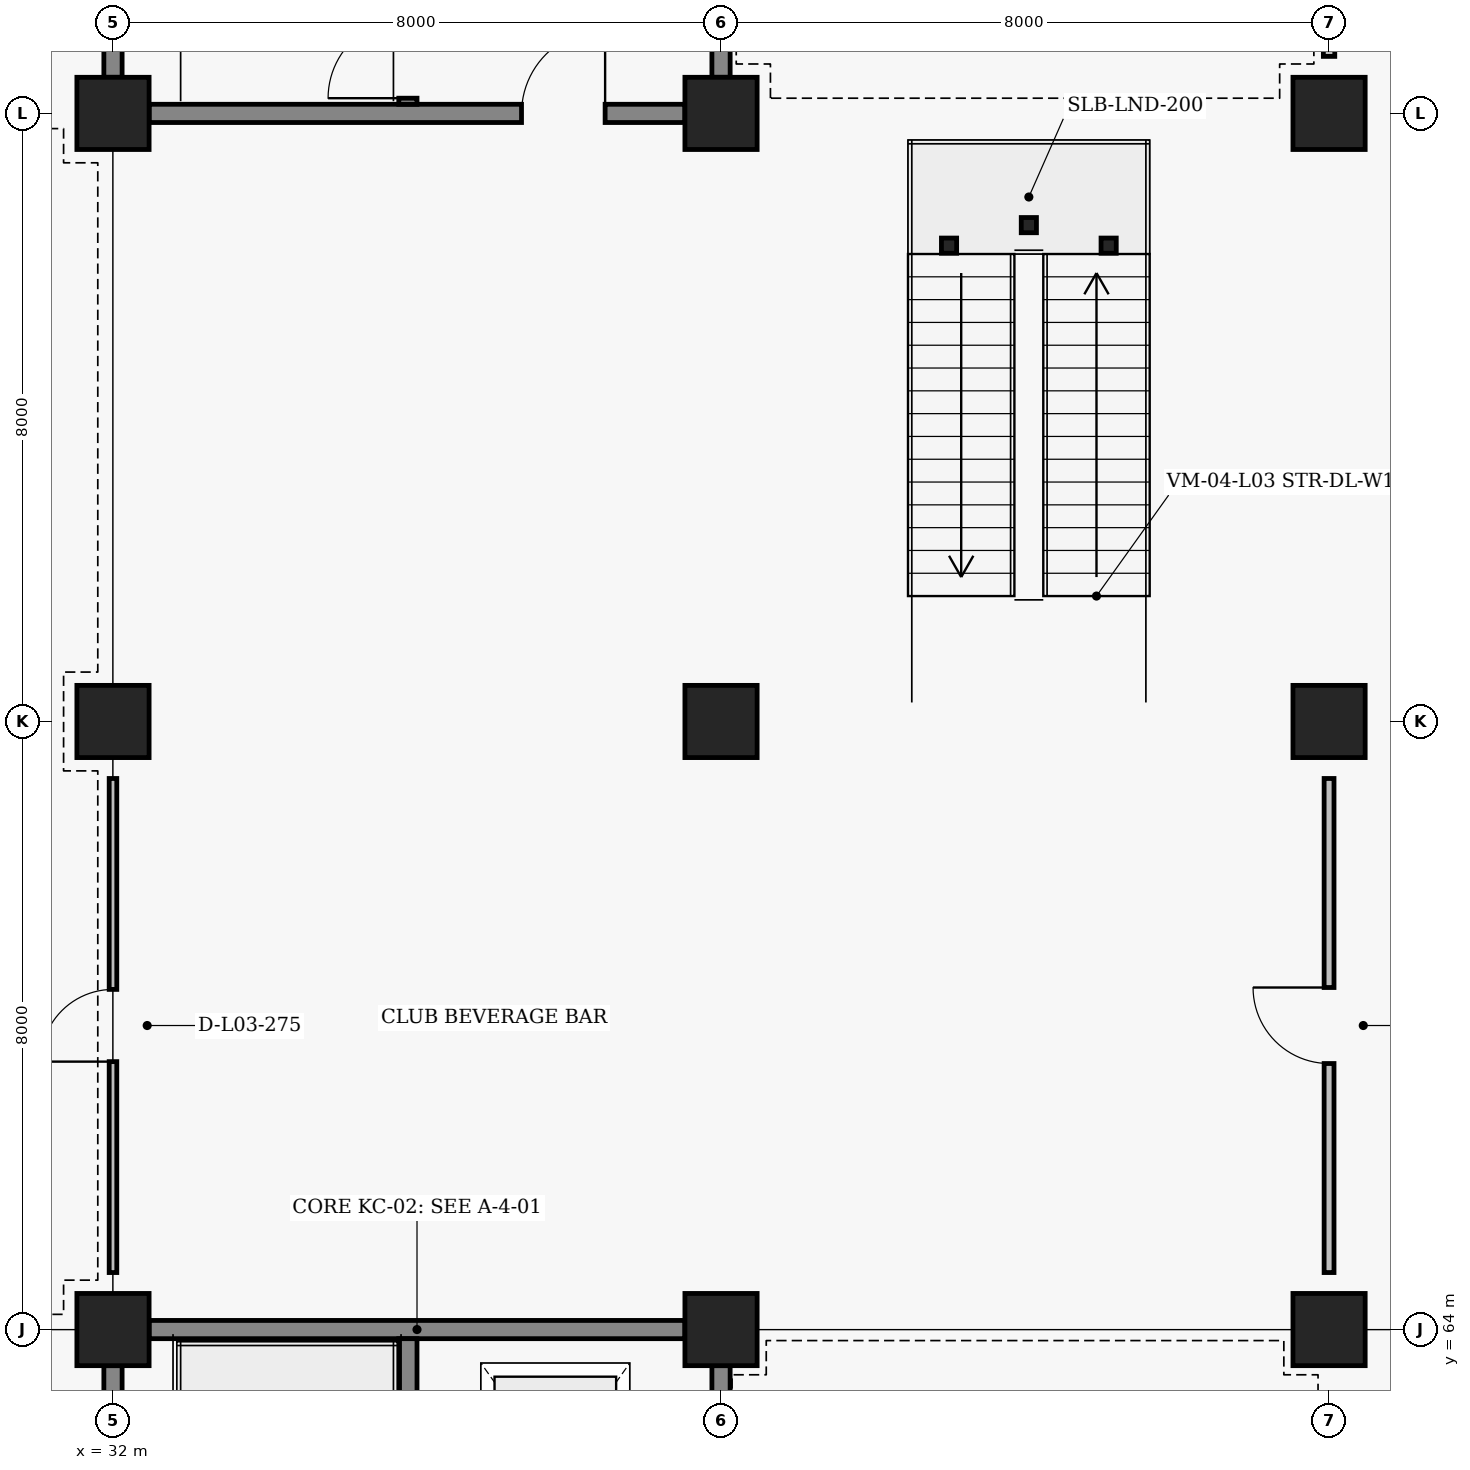
"""IFC4 building model, lengths in metres.
Left out: names, types, materials, properties, quantities, classifications, styles, units other than length and angle.
Written with IfcOpenShell. Run it as: python <this file> out.ifc"""

import sys

from ifc_helpers import new_model, si_unit, direction, frame, frame_2d, origin, origin_2d, place, context, subcontext, project, spatial, rectangle, hollow_rectangle, extrude, element, fill, save


model = new_model("IFC4")
c1 = context("Model", 3, precision=1e-05, world=origin(), true_north=direction((0.0, 1.0)))
c2 = subcontext(c1, "Body", "Model", "MODEL_VIEW")
j1 = project(units=[si_unit("LENGTHUNIT", "METRE"), si_unit("PLANEANGLEUNIT", "RADIAN")], contexts=[c1])
p1 = place(None, origin())
s1 = spatial("IfcSite", under=j1, at=p1, CompositionType="ELEMENT")
p2 = place(p1, origin())
s2 = spatial("IfcBuilding", under=s1, at=p2, CompositionType="ELEMENT")
p3 = place(p2, frame((0.0, 0.0, 9.6)))
s3 = spatial("IfcBuildingStorey", under=s2, at=p3, CompositionType="ELEMENT", Elevation=9.6)
for number, where, z_axis, x_axis in (
    (1, (32.0, 64.0, 0.0), (0.0, 0.0, 1.0), (1.0, 0.0, 0.0)),
    (2, (32.0, 72.0, 0.0), (0.0, 0.0, 1.0), (1.0, 0.0, 0.0)),
    (3, (32.0, 80.0, 0.0), (0.0, 0.0, 1.0), (1.0, 0.0, 0.0)),
    (4, (40.0, 64.0, 0.0), (0.0, 0.0, 1.0), (1.0, 0.0, 0.0)),
    (5, (40.0, 72.0, 0.0), (0.0, 0.0, 1.0), (1.0, 0.0, 0.0)),
    (6, (40.0, 80.0, 0.0), (0.0, 0.0, 1.0), (1.0, 0.0, 0.0)),
    (7, (48.0, 64.0, 0.0), (0.0, 0.0, 1.0), (1.0, 0.0, 0.0)),
    (8, (48.0, 72.0, 0.0), (0.0, 0.0, 1.0), (1.0, 0.0, 0.0)),
    (9, (48.0, 80.0, 0.0), (0.0, 0.0, 1.0), (1.0, 0.0, 0.0)),
):
    element("IfcColumn", number, at=place(p3, frame(where, z_axis=z_axis, x_axis=x_axis)), inside=s3, PredefinedType="COLUMN", context=c2, shape_type="SweptSolid", body=[
        extrude(rectangle(XDim=0.95, YDim=0.95, at=origin_2d()), origin(), (0.0, 0.0, 1.0), 4.8),
    ])
for number, where, z_axis, x_axis in (
    (10, (32.475, 64.0, 0.0), (0.0, 0.0, 1.0), (1.0, 0.0, 0.0)),
    (11, (32.0, 56.475, 0.0), (0.0, 0.0, 1.0), (0.0, 1.0, 0.0)),
    (12, (40.0, 56.475, 0.0), (0.0, 0.0, 1.0), (0.0, 1.0, 0.0)),
):
    element("IfcWall", number, at=place(p3, frame(where, z_axis=z_axis, x_axis=x_axis)), inside=s3, PredefinedType="SHEAR", context=c2, shape_type="SweptSolid", body=[
        extrude(rectangle(XDim=7.05, YDim=0.24, at=frame_2d((3.525, 0.0))), origin(), (0.0, 0.0, 1.0), 3.93),
    ])
p4 = place(p3, frame((35.88, 56.12, 0.0), z_axis=(0.0, 0.0, 1.0), x_axis=(0.0, 1.0, 0.0)))
e13 = element("IfcWall", 13, at=p4, inside=s3, PredefinedType="SHEAR", context=c2, shape_type="SweptSolid", body=[
    extrude(rectangle(XDim=7.76, YDim=0.24, at=frame_2d((3.88, 0.0))), origin(), (0.0, 0.0, 1.0), 4.03),
])
p5 = place(p4, frame((0.08, 0.0, 0.0)))
e14 = element("IfcOpeningElement", 14, at=p5, cuts=e13, PredefinedType="OPENING", context=c2, shape_type="SweptSolid", body=[
    extrude(rectangle(XDim=1.05, YDim=2.15, at=frame_2d((0.525, 1.075))), frame((0.0, 0.13, 0.0), z_axis=(0.0, -1.0, 0.0), x_axis=(1.0, 0.0, 0.0)), (0.0, 0.0, 1.0), 0.26),
])
p6 = place(p3, frame((32.475, 80.0, 0.0), z_axis=(0.0, 0.0, 1.0), x_axis=(1.0, 0.0, 0.0)))
e15 = element("IfcWall", 15, at=p6, inside=s3, PredefinedType="SHEAR", context=c2, shape_type="SweptSolid", body=[
    extrude(rectangle(XDim=7.05, YDim=0.24, at=frame_2d((3.525, 0.0))), origin(), (0.0, 0.0, 1.0), 3.93),
])
p7 = place(p6, frame((4.9, 0.0, 0.0)))
e16 = element("IfcOpeningElement", 16, at=p7, cuts=e15, PredefinedType="OPENING", context=c2, shape_type="SweptSolid", body=[
    extrude(rectangle(XDim=1.1, YDim=2.2, at=frame_2d((0.55, 1.1))), frame((0.0, 0.13, 0.0), z_axis=(0.0, -1.0, 0.0), x_axis=(1.0, 0.0, 0.0)), (0.0, 0.0, 1.0), 0.26),
])
p8 = place(p3, frame((32.0, 80.475, 0.0), z_axis=(0.0, 0.0, 1.0), x_axis=(0.0, 1.0, 0.0)))
e17 = element("IfcWall", 17, at=p8, inside=s3, PredefinedType="SHEAR", context=c2, shape_type="SweptSolid", body=[
    extrude(rectangle(XDim=7.05, YDim=0.24, at=frame_2d((3.525, 0.0))), origin(), (0.0, 0.0, 1.0), 3.93),
])
p9 = place(p3, frame((40.0, 80.475, 0.0), z_axis=(0.0, 0.0, 1.0), x_axis=(0.0, 1.0, 0.0)))
e18 = element("IfcWall", 18, at=p9, inside=s3, PredefinedType="SHEAR", context=c2, shape_type="SweptSolid", body=[
    extrude(rectangle(XDim=7.05, YDim=0.24, at=frame_2d((3.525, 0.0))), origin(), (0.0, 0.0, 1.0), 3.68),
])
p10 = place(p3, frame((35.88, 80.12, 0.0), z_axis=(0.0, 0.0, 1.0), x_axis=(0.0, 1.0, 0.0)))
e19 = element("IfcWall", 19, at=p10, inside=s3, PredefinedType="SHEAR", context=c2, shape_type="SweptSolid", body=[
    extrude(rectangle(XDim=7.76, YDim=0.24, at=frame_2d((3.88, 0.0))), origin(), (0.0, 0.0, 1.0), 4.03),
])
p11 = place(p10, frame((0.08, 0.0, 0.0)))
e20 = element("IfcOpeningElement", 20, at=p11, cuts=e19, PredefinedType="OPENING", context=c2, shape_type="SweptSolid", body=[
    extrude(rectangle(XDim=1.05, YDim=2.15, at=frame_2d((0.525, 1.075))), frame((0.0, 0.13, 0.0), z_axis=(0.0, -1.0, 0.0), x_axis=(1.0, 0.0, 0.0)), (0.0, 0.0, 1.0), 0.26),
])
for number, where, z_axis, x_axis in (
    (21, (43.0, 78.26, 0.0), (0.0, 0.0, 1.0), (1.0, 0.0, 0.0)),
    (22, (45.1, 78.26, 0.0), (0.0, 0.0, 1.0), (1.0, 0.0, 0.0)),
    (23, (44.05, 78.53, 0.0), (0.0, 0.0, 1.0), (1.0, 0.0, 0.0)),
):
    element("IfcColumn", number, at=place(p3, frame(where, z_axis=z_axis, x_axis=x_axis)), inside=s3, PredefinedType="COLUMN", context=c2, shape_type="SweptSolid", body=[
        extrude(hollow_rectangle(XDim=0.2, YDim=0.2, WallThickness=0.009, at=origin_2d()), origin(), (0.0, 0.0, 1.0), 2.2),
    ])
p12 = place(p3, frame((32.0, 64.75, 0.0), z_axis=(0.0, 0.0, 1.0), x_axis=(0.0, 1.0, 0.0)))
e24 = element("IfcWall", 24, at=p12, inside=s3, PredefinedType="PARTITIONING", context=c2, shape_type="SweptSolid", body=[
    extrude(rectangle(XDim=6.5, YDim=0.1, at=frame_2d((3.25, 0.0))), origin(), (0.0, 0.0, 1.0), 3.93),
])
p13 = place(p12, frame((2.775, 0.0, 0.0)))
e25 = element("IfcOpeningElement", 25, at=p13, cuts=e24, PredefinedType="OPENING", context=c2, shape_type="SweptSolid", body=[
    extrude(rectangle(XDim=0.95, YDim=2.1, at=frame_2d((0.475, 1.05))), frame((0.0, 0.06, 0.0), z_axis=(0.0, -1.0, 0.0), x_axis=(1.0, 0.0, 0.0)), (0.0, 0.0, 1.0), 0.12),
])
p14 = place(p3, frame((48.0, 64.75, 0.0), z_axis=(0.0, 0.0, 1.0), x_axis=(0.0, 1.0, 0.0)))
e26 = element("IfcWall", 26, at=p14, inside=s3, PredefinedType="PARTITIONING", context=c2, shape_type="SweptSolid", body=[
    extrude(rectangle(XDim=6.5, YDim=0.13, at=frame_2d((3.25, 0.0))), origin(), (0.0, 0.0, 1.0), 3.93),
])
p15 = place(p14, frame((2.75, 0.0, 0.0)))
e27 = element("IfcOpeningElement", 27, at=p15, cuts=e26, PredefinedType="OPENING", context=c2, shape_type="SweptSolid", body=[
    extrude(rectangle(XDim=1.0, YDim=2.1, at=frame_2d((0.5, 1.05))), frame((0.0, 0.075, 0.0), z_axis=(0.0, -1.0, 0.0), x_axis=(1.0, 0.0, 0.0)), (0.0, 0.0, 1.0), 0.15),
])
p16 = place(p3, frame((48.0, 80.75, 0.0), z_axis=(0.0, 0.0, 1.0), x_axis=(0.0, 1.0, 0.0)))
e28 = element("IfcWall", 28, at=p16, inside=s3, PredefinedType="PARTITIONING", context=c2, shape_type="SweptSolid", body=[
    extrude(rectangle(XDim=6.5, YDim=0.15, at=frame_2d((3.25, 0.0))), origin(), (0.0, 0.0, 1.0), 3.93),
])
p17 = place(p16, frame((2.725, 0.0, 0.0)))
e29 = element("IfcOpeningElement", 29, at=p17, cuts=e28, PredefinedType="OPENING", context=c2, shape_type="SweptSolid", body=[
    extrude(rectangle(XDim=1.05, YDim=2.15, at=frame_2d((0.525, 1.075))), frame((0.0, 0.085, 0.0), z_axis=(0.0, -1.0, 0.0), x_axis=(1.0, 0.0, 0.0)), (0.0, 0.0, 1.0), 0.17),
])
p18 = place(p7, origin())
e30 = element("IfcDoor", 30, at=p18, inside=s3, OperationType="SINGLE_SWING_RIGHT", PredefinedType="DOOR", context=c2, shape_type="SweptSolid", body=[
    extrude(rectangle(XDim=1.1, YDim=2.2, at=frame_2d((0.55, 1.1))), frame((0.0, 0.025, 0.0), z_axis=(0.0, -1.0, 0.0), x_axis=(1.0, 0.0, 0.0)), (0.0, 0.0, 1.0), 0.05),
])
fill(e16, e30)
p19 = place(p11, origin())
e31 = element("IfcDoor", 31, at=p19, inside=s3, OperationType="SINGLE_SWING_LEFT", PredefinedType="DOOR", context=c2, shape_type="SweptSolid", body=[
    extrude(rectangle(XDim=1.05, YDim=2.15, at=frame_2d((0.525, 1.075))), frame((0.0, 0.025, 0.0), z_axis=(0.0, -1.0, 0.0), x_axis=(1.0, 0.0, 0.0)), (0.0, 0.0, 1.0), 0.05),
])
fill(e20, e31)
p20 = place(p13, origin())
e32 = element("IfcDoor", 32, at=p20, inside=s3, OperationType="SINGLE_SWING_LEFT", PredefinedType="DOOR", context=c2, shape_type="SweptSolid", body=[
    extrude(rectangle(XDim=0.95, YDim=2.1, at=frame_2d((0.475, 1.05))), frame((0.0, 0.025, 0.0), z_axis=(0.0, -1.0, 0.0), x_axis=(1.0, 0.0, 0.0)), (0.0, 0.0, 1.0), 0.05),
])
fill(e25, e32)
p21 = place(p15, origin())
e33 = element("IfcDoor", 33, at=p21, inside=s3, OperationType="SINGLE_SWING_RIGHT", PredefinedType="DOOR", context=c2, shape_type="SweptSolid", body=[
    extrude(rectangle(XDim=1.0, YDim=2.1, at=frame_2d((0.5, 1.05))), frame((0.0, 0.025, 0.0), z_axis=(0.0, -1.0, 0.0), x_axis=(1.0, 0.0, 0.0)), (0.0, 0.0, 1.0), 0.05),
])
fill(e27, e33)
save(model, sys.argv[1])
